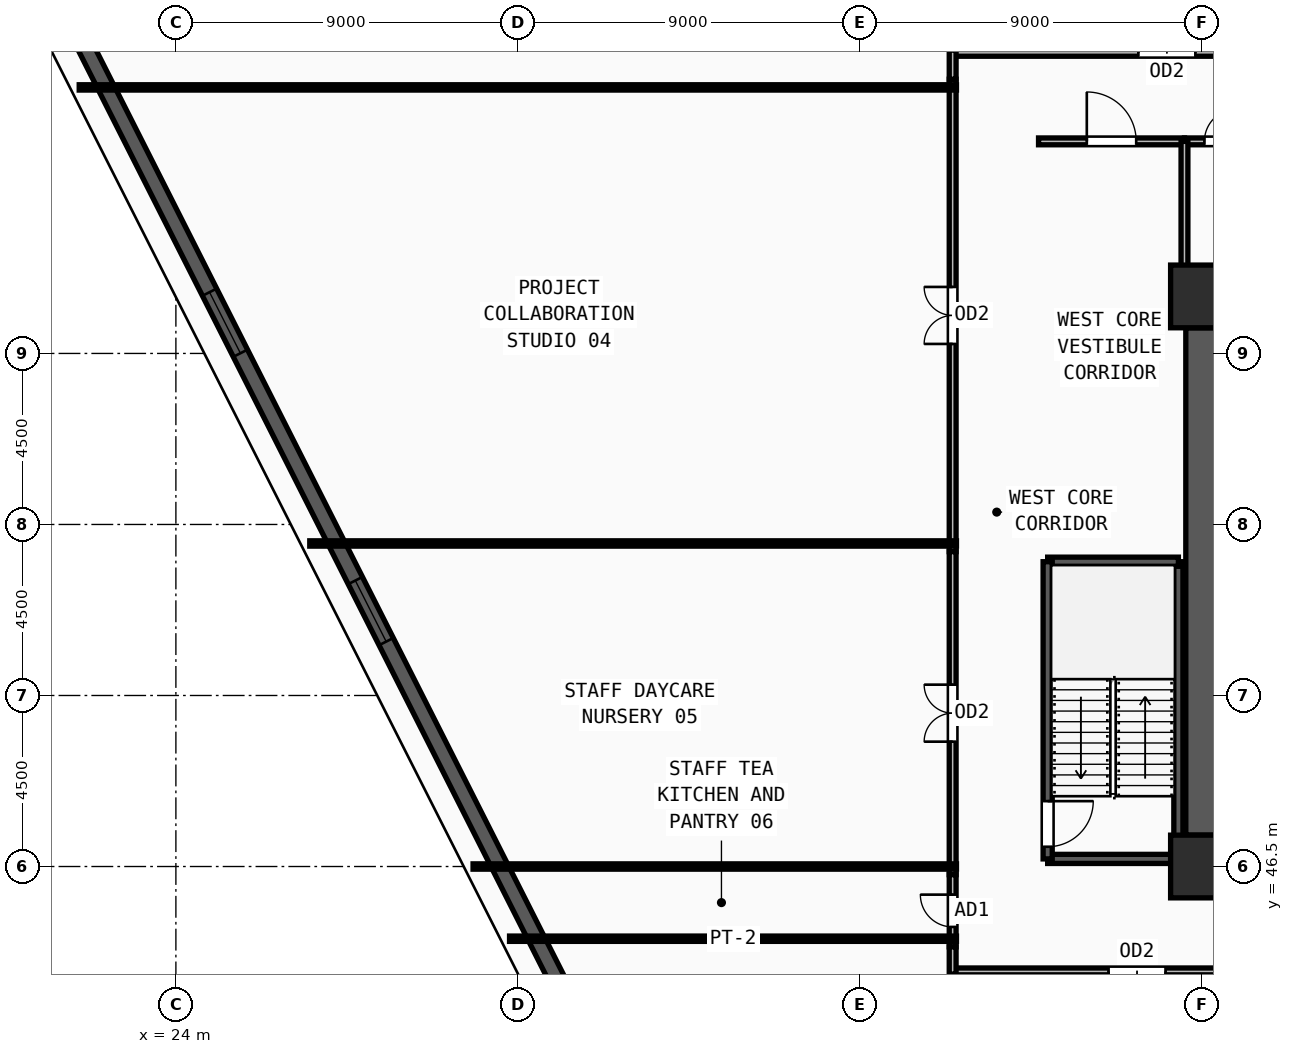
"""IFC4 building model, lengths in metres.
Left out: names, types, materials, properties, quantities, classifications, styles, units other than length and angle.
Written with IfcOpenShell. Run it as: python <this file> out.ifc"""

import sys

from ifc_helpers import new_model, si_unit, direction, frame, frame_2d, origin, origin_2d, place, context, subcontext, project, spatial, rectangle, extrude, source, transform, mapped, element, fill, save


model = new_model("IFC4")
c1 = context("Model", 3, precision=1e-05, world=origin(), true_north=direction((0.0, 1.0)))
c2 = subcontext(c1, "Body", "Model", "MODEL_VIEW")
j1 = project(units=[si_unit("LENGTHUNIT", "METRE"), si_unit("PLANEANGLEUNIT", "RADIAN")], contexts=[c1])
p1 = place(None, origin())
s1 = spatial("IfcSite", under=j1, at=p1, CompositionType="ELEMENT")
p2 = place(p1, origin())
s2 = spatial("IfcBuilding", under=s1, at=p2, CompositionType="ELEMENT")
p3 = place(p2, frame((0.0, 0.0, 39.75)))
s3 = spatial("IfcBuildingStorey", under=s2, at=p3, CompositionType="ELEMENT", Elevation=39.75)
m1 = source(origin(), c2, "Body", "SweptSolid", [
    extrude(rectangle(XDim=1.65, YDim=1.65, at=origin_2d()), origin(), (0.0, 0.0, 1.0), 3.75),
])
for number, where, z_axis, x_axis in (
    (1, (51.0, 46.5, 0.0), (0.0, 0.0, 1.0), (1.0, 0.0, 0.0)),
    (2, (51.0, 61.5, 0.0), (0.0, 0.0, 1.0), (1.0, 0.0, 0.0)),
):
    element("IfcColumn", number, at=place(p3, frame(where, z_axis=z_axis, x_axis=x_axis)), inside=s3, PredefinedType="COLUMN", context=c2, shape_type="MappedRepresentation", body=[
        mapped(m1, transform((0.0, 0.0, 0.0), x_axis=(1.0, 0.0, 0.0), y_axis=(0.0, 1.0, 0.0), z_axis=(0.0, 0.0, 1.0), scale=1.0)),
    ])
p4 = place(p3, frame((21.456, 68.395, 0.0), z_axis=(0.0, 0.0, 1.0), x_axis=(0.451198099626, -0.892423820219, 0.0)))
e3 = element("IfcWall", 3, at=p4, inside=s3, PredefinedType="SOLIDWALL", context=c2, shape_type="SweptSolid", body=[
    extrude(rectangle(XDim=34.005, YDim=0.42, at=frame_2d((17.002, 0.0))), origin(), (0.0, 0.0, 1.0), 3.57),
])
m2 = source(origin(), c2, "Body", "SweptSolid", [
    extrude(rectangle(XDim=1.8, YDim=1.95, at=frame_2d((0.9, 0.975))), frame((0.0, 0.22, 0.0), z_axis=(0.0, -1.0, 0.0), x_axis=(1.0, 0.0, 0.0)), (0.0, 0.0, 1.0), 0.44),
])
p5 = place(p4, frame((7.601, 0.0, 0.55)))
e4 = element("IfcOpeningElement", 4, at=p5, cuts=e3, PredefinedType="OPENING", context=c2, shape_type="MappedRepresentation", body=[
    mapped(m2, transform((0.0, 0.0, 0.0), x_axis=(1.0, 0.0, 0.0), y_axis=(0.0, 1.0, 0.0), z_axis=(0.0, 0.0, 1.0), scale=1.0)),
])
p6 = place(p4, frame((16.103, 0.0, 0.55)))
e5 = element("IfcOpeningElement", 5, at=p6, cuts=e3, PredefinedType="OPENING", context=c2, shape_type="MappedRepresentation", body=[
    mapped(m2, transform((0.0, 0.0, 0.0), x_axis=(1.0, 0.0, 0.0), y_axis=(0.0, 1.0, 0.0), z_axis=(0.0, 0.0, 1.0), scale=1.0)),
])
p7 = place(p3, frame((51.0, 47.325, 0.0), z_axis=(0.0, 0.0, 1.0), x_axis=(0.0, 1.0, 0.0)))
e6 = element("IfcWall", 6, at=p7, inside=s3, PredefinedType="SHEAR", context=c2, shape_type="SweptSolid", body=[
    extrude(rectangle(XDim=13.35, YDim=0.85, at=frame_2d((6.675, 0.0))), origin(), (0.0, 0.0, 1.0), 3.57),
])
p8 = place(p3, frame((46.94, 46.7, 0.0), z_axis=(0.0, 0.0, 1.0), x_axis=(1.0, 0.0, 0.0)))
e7 = element("IfcWall", 7, at=p8, inside=s3, PredefinedType="SOLIDWALL", context=c2, shape_type="SweptSolid", body=[
    extrude(rectangle(XDim=3.44, YDim=0.24, at=frame_2d((1.72, 0.0))), origin(), (0.0, 0.0, 1.0), 3.57),
])
p9 = place(p3, frame((50.38, 46.7, 0.0), z_axis=(0.0, 0.0, 1.0), x_axis=(0.0, 1.0, 0.0)))
e8 = element("IfcWall", 8, at=p9, inside=s3, PredefinedType="SOLIDWALL", context=c2, shape_type="SweptSolid", body=[
    extrude(rectangle(XDim=7.82, YDim=0.24, at=frame_2d((3.91, 0.0))), origin(), (0.0, 0.0, 1.0), 3.57),
])
p10 = place(p3, frame((50.38, 54.52, 0.0), z_axis=(0.0, 0.0, 1.0), x_axis=(-1.0, 0.0, 0.0)))
e9 = element("IfcWall", 9, at=p10, inside=s3, PredefinedType="SOLIDWALL", context=c2, shape_type="SweptSolid", body=[
    extrude(rectangle(XDim=3.44, YDim=0.24, at=frame_2d((1.72, 0.0))), origin(), (0.0, 0.0, 1.0), 3.57),
])
p11 = place(p3, frame((46.94, 54.52, 0.0), z_axis=(0.0, 0.0, 1.0), x_axis=(0.0, -1.0, 0.0)))
e10 = element("IfcWall", 10, at=p11, inside=s3, PredefinedType="SOLIDWALL", context=c2, shape_type="SweptSolid", body=[
    extrude(rectangle(XDim=7.82, YDim=0.24, at=frame_2d((3.91, 0.0))), origin(), (0.0, 0.0, 1.0), 3.57),
])
m3 = source(origin(), c2, "Body", "SweptSolid", [
    extrude(rectangle(XDim=1.2, YDim=2.2, at=frame_2d((0.6, 1.1))), frame((0.0, 0.13, 0.0), z_axis=(0.0, -1.0, 0.0), x_axis=(1.0, 0.0, 0.0)), (0.0, 0.0, 1.0), 0.26),
])
p12 = place(p11, frame((6.3, 0.0, 0.0)))
e11 = element("IfcOpeningElement", 11, at=p12, cuts=e10, PredefinedType="OPENING", context=c2, shape_type="MappedRepresentation", body=[
    mapped(m3, transform((0.0, 0.0, 0.0), x_axis=(1.0, 0.0, 0.0), y_axis=(0.0, 1.0, 0.0), z_axis=(0.0, 0.0, 1.0), scale=1.0)),
])
p13 = place(p3, frame((50.54, 65.58, 0.0), z_axis=(0.0, 0.0, 1.0), x_axis=(1.0, 0.0, 0.0)))
e12 = element("IfcWall", 12, at=p13, inside=s3, PredefinedType="PARTITIONING", context=c2, shape_type="SweptSolid", body=[
    extrude(rectangle(XDim=1.9, YDim=0.18, at=frame_2d((0.95, 0.0))), origin(), (0.0, 0.0, 1.0), 3.57),
])
m4 = source(origin(), c2, "Body", "SweptSolid", [
    extrude(rectangle(XDim=0.85, YDim=2.1, at=frame_2d((0.425, 1.05))), frame((0.0, 0.1, 0.0), z_axis=(0.0, -1.0, 0.0), x_axis=(1.0, 0.0, 0.0)), (0.0, 0.0, 1.0), 0.2),
])
p14 = place(p13, frame((0.525, 0.0, 0.0)))
e13 = element("IfcOpeningElement", 13, at=p14, cuts=e12, PredefinedType="OPENING", context=c2, shape_type="MappedRepresentation", body=[
    mapped(m4, transform((0.0, 0.0, 0.0), x_axis=(1.0, 0.0, 0.0), y_axis=(0.0, 1.0, 0.0), z_axis=(0.0, 0.0, 1.0), scale=1.0)),
])
p15 = place(p3, frame((46.7, 65.58, 0.0), z_axis=(0.0, 0.0, 1.0), x_axis=(1.0, 0.0, 0.0)))
e14 = element("IfcWall", 14, at=p15, inside=s3, PredefinedType="PARTITIONING", context=c2, shape_type="SweptSolid", body=[
    extrude(rectangle(XDim=3.84, YDim=0.18, at=frame_2d((1.92, 0.0))), origin(), (0.0, 0.0, 1.0), 3.57),
])
m5 = source(origin(), c2, "Body", "SweptSolid", [
    extrude(rectangle(XDim=1.3, YDim=2.2, at=frame_2d((0.65, 1.1))), frame((0.0, 0.1, 0.0), z_axis=(0.0, -1.0, 0.0), x_axis=(1.0, 0.0, 0.0)), (0.0, 0.0, 1.0), 0.2),
])
p16 = place(p15, frame((1.27, 0.0, 0.0)))
e15 = element("IfcOpeningElement", 15, at=p16, cuts=e14, PredefinedType="OPENING", context=c2, shape_type="MappedRepresentation", body=[
    mapped(m5, transform((0.0, 0.0, 0.0), x_axis=(1.0, 0.0, 0.0), y_axis=(0.0, 1.0, 0.0), z_axis=(0.0, 0.0, 1.0), scale=1.0)),
])
p17 = place(p3, frame((44.37, 67.91, 0.0), z_axis=(0.0, 0.0, 1.0), x_axis=(1.0, 0.0, 0.0)))
e16 = element("IfcWall", 16, at=p17, inside=s3, PredefinedType="PARTITIONING", context=c2, shape_type="SweptSolid", body=[
    extrude(rectangle(XDim=11.415, YDim=0.18, at=frame_2d((5.708, 0.0))), origin(), (0.0, 0.0, 1.0), 3.57),
])
m6 = source(origin(), c2, "Body", "SweptSolid", [
    extrude(rectangle(XDim=1.5, YDim=2.2, at=frame_2d((0.75, 1.1))), frame((0.0, 0.1, 0.0), z_axis=(0.0, -1.0, 0.0), x_axis=(1.0, 0.0, 0.0)), (0.0, 0.0, 1.0), 0.2),
])
p18 = place(p17, frame((4.957, 0.0, 0.0)))
e17 = element("IfcOpeningElement", 17, at=p18, cuts=e16, PredefinedType="OPENING", context=c2, shape_type="MappedRepresentation", body=[
    mapped(m6, transform((0.0, 0.0, 0.0), x_axis=(1.0, 0.0, 0.0), y_axis=(0.0, 1.0, 0.0), z_axis=(0.0, 0.0, 1.0), scale=1.0)),
])
p19 = place(p3, frame((44.44, 54.785, 0.0), z_axis=(0.0, 0.0, 1.0), x_axis=(0.0, 1.0, 0.0)))
e18 = element("IfcWall", 18, at=p19, inside=s3, PredefinedType="PARTITIONING", context=c2, shape_type="SweptSolid", body=[
    extrude(rectangle(XDim=12.43, YDim=0.18, at=frame_2d((6.215, 0.0))), origin(), (0.0, 0.0, 1.0), 3.57),
])
p20 = place(p19, frame((5.465, 0.0, 0.0)))
e19 = element("IfcOpeningElement", 19, at=p20, cuts=e18, PredefinedType="OPENING", context=c2, shape_type="MappedRepresentation", body=[
    mapped(m6, transform((0.0, 0.0, 0.0), x_axis=(1.0, 0.0, 0.0), y_axis=(0.0, 1.0, 0.0), z_axis=(0.0, 0.0, 1.0), scale=1.0)),
])
p21 = place(p3, frame((44.44, 46.285, 0.0), z_axis=(0.0, 0.0, 1.0), x_axis=(0.0, 1.0, 0.0)))
e20 = element("IfcWall", 20, at=p21, inside=s3, PredefinedType="PARTITIONING", context=c2, shape_type="SweptSolid", body=[
    extrude(rectangle(XDim=8.5, YDim=0.18, at=frame_2d((4.25, 0.0))), origin(), (0.0, 0.0, 1.0), 3.57),
])
p22 = place(p21, frame((3.5, 0.0, 0.0)))
e21 = element("IfcOpeningElement", 21, at=p22, cuts=e20, PredefinedType="OPENING", context=c2, shape_type="MappedRepresentation", body=[
    mapped(m6, transform((0.0, 0.0, 0.0), x_axis=(1.0, 0.0, 0.0), y_axis=(0.0, 1.0, 0.0), z_axis=(0.0, 0.0, 1.0), scale=1.0)),
])
p23 = place(p3, frame((44.44, 44.385, 0.0), z_axis=(0.0, 0.0, 1.0), x_axis=(0.0, 1.0, 0.0)))
e22 = element("IfcWall", 22, at=p23, inside=s3, PredefinedType="PARTITIONING", context=c2, shape_type="SweptSolid", body=[
    extrude(rectangle(XDim=1.9, YDim=0.18, at=frame_2d((0.95, 0.0))), origin(), (0.0, 0.0, 1.0), 3.57),
])
p24 = place(p23, frame((0.525, 0.0, 0.0)))
e23 = element("IfcOpeningElement", 23, at=p24, cuts=e22, PredefinedType="OPENING", context=c2, shape_type="MappedRepresentation", body=[
    mapped(m4, transform((0.0, 0.0, 0.0), x_axis=(1.0, 0.0, 0.0), y_axis=(0.0, 1.0, 0.0), z_axis=(0.0, 0.0, 1.0), scale=1.0)),
])
p25 = place(p3, frame((54.215, 43.74, 0.0), z_axis=(0.0, 0.0, 1.0), x_axis=(-1.0, 0.0, 0.0)))
e24 = element("IfcWall", 24, at=p25, inside=s3, PredefinedType="PARTITIONING", context=c2, shape_type="SweptSolid", body=[
    extrude(rectangle(XDim=9.845, YDim=0.18, at=frame_2d((4.922, 0.0))), origin(), (0.0, 0.0, 1.0), 3.57),
])
p26 = place(p25, frame((4.173, 0.0, 0.0)))
e25 = element("IfcOpeningElement", 25, at=p26, cuts=e24, PredefinedType="OPENING", context=c2, shape_type="MappedRepresentation", body=[
    mapped(m6, transform((0.0, 0.0, 0.0), x_axis=(1.0, 0.0, 0.0), y_axis=(0.0, 1.0, 0.0), z_axis=(0.0, 0.0, 1.0), scale=1.0)),
])
p27 = place(p3, frame((50.54, 61.95, 0.0), z_axis=(0.0, 0.0, 1.0), x_axis=(0.0, 1.0, 0.0)))
e26 = element("IfcWall", 26, at=p27, inside=s3, PredefinedType="PARTITIONING", context=c2, shape_type="SweptSolid", body=[
    extrude(rectangle(XDim=3.63, YDim=0.18, at=frame_2d((1.815, 0.0))), origin(), (0.0, 0.0, 1.0), 3.57),
])
p28 = place(p3, frame((44.44, 67.215, 0.0), z_axis=(0.0, 0.0, 1.0), x_axis=(0.0, 1.0, 0.0)))
e27 = element("IfcWall", 27, at=p28, inside=s3, PredefinedType="PARTITIONING", context=c2, shape_type="SweptSolid", body=[
    extrude(rectangle(XDim=0.765, YDim=0.18, at=frame_2d((0.382, 0.0))), origin(), (0.0, 0.0, 1.0), 3.57),
])
p29 = place(p3, frame((44.44, 43.67, 0.0), z_axis=(0.0, 0.0, 1.0), x_axis=(0.0, 1.0, 0.0)))
e28 = element("IfcWall", 28, at=p29, inside=s3, PredefinedType="PARTITIONING", context=c2, shape_type="SweptSolid", body=[
    extrude(rectangle(XDim=0.715, YDim=0.18, at=frame_2d((0.357, 0.0))), origin(), (0.0, 0.0, 1.0), 3.57),
])
p30 = place(p3, frame((44.54, 44.6, 0.0), z_axis=(0.0, 0.0, 1.0), x_axis=(-1.0, 0.0, 0.0)))
e29 = element("IfcWall", 29, at=p30, inside=s3, PredefinedType="PARTITIONING", context=c2, shape_type="SweptSolid", body=[
    extrude(rectangle(XDim=11.76, YDim=0.14, at=frame_2d((5.88, 0.0))), origin(), (0.0, 0.0, 1.0), 3.57),
])
p31 = place(p3, frame((44.54, 46.5, 0.0), z_axis=(0.0, 0.0, 1.0), x_axis=(-1.0, 0.0, 0.0)))
e30 = element("IfcWall", 30, at=p31, inside=s3, PredefinedType="PARTITIONING", context=c2, shape_type="SweptSolid", body=[
    extrude(rectangle(XDim=12.72, YDim=0.14, at=frame_2d((6.36, 0.0))), origin(), (0.0, 0.0, 1.0), 3.57),
])
p32 = place(p3, frame((44.54, 55.0, 0.0), z_axis=(0.0, 0.0, 1.0), x_axis=(-1.0, 0.0, 0.0)))
e31 = element("IfcWall", 31, at=p32, inside=s3, PredefinedType="PARTITIONING", context=c2, shape_type="SweptSolid", body=[
    extrude(rectangle(XDim=17.017, YDim=0.14, at=frame_2d((8.509, 0.0))), origin(), (0.0, 0.0, 1.0), 3.57),
])
p33 = place(p3, frame((44.54, 67.0, 0.0), z_axis=(0.0, 0.0, 1.0), x_axis=(-1.0, 0.0, 0.0)))
e32 = element("IfcWall", 32, at=p33, inside=s3, PredefinedType="PARTITIONING", context=c2, shape_type="SweptSolid", body=[
    extrude(rectangle(XDim=23.084, YDim=0.14, at=frame_2d((11.542, 0.0))), origin(), (0.0, 0.0, 1.0), 2.655),
])
m7 = source(origin(), c2, "Body", "SweptSolid", [
    extrude(rectangle(XDim=1.8, YDim=1.95, at=frame_2d((0.9, 0.975))), frame((0.0, 0.03, 0.0), z_axis=(0.0, -1.0, 0.0), x_axis=(1.0, 0.0, 0.0)), (0.0, 0.0, 1.0), 0.06),
])
p34 = place(p5, origin())
e33 = element("IfcWindow", 33, at=p34, inside=s3, PartitioningType="DOUBLE_PANEL_VERTICAL", PredefinedType="WINDOW", context=c2, shape_type="MappedRepresentation", body=[
    mapped(m7, transform((0.0, 0.0, 0.0), x_axis=(1.0, 0.0, 0.0), y_axis=(0.0, 1.0, 0.0), z_axis=(0.0, 0.0, 1.0), scale=1.0)),
])
fill(e4, e33)
p35 = place(p6, origin())
e34 = element("IfcWindow", 34, at=p35, inside=s3, PartitioningType="DOUBLE_PANEL_VERTICAL", PredefinedType="WINDOW", context=c2, shape_type="MappedRepresentation", body=[
    mapped(m7, transform((0.0, 0.0, 0.0), x_axis=(1.0, 0.0, 0.0), y_axis=(0.0, 1.0, 0.0), z_axis=(0.0, 0.0, 1.0), scale=1.0)),
])
fill(e5, e34)
m8 = source(origin(), c2, "Body", "SweptSolid", [
    extrude(rectangle(XDim=1.2, YDim=2.2, at=frame_2d((0.6, 1.1))), frame((0.0, 0.025, 0.0), z_axis=(0.0, -1.0, 0.0), x_axis=(1.0, 0.0, 0.0)), (0.0, 0.0, 1.0), 0.05),
])
p36 = place(p12, origin())
e35 = element("IfcDoor", 35, at=p36, inside=s3, OperationType="SINGLE_SWING_LEFT", PredefinedType="DOOR", context=c2, shape_type="MappedRepresentation", body=[
    mapped(m8, transform((0.0, 0.0, 0.0), x_axis=(1.0, 0.0, 0.0), y_axis=(0.0, 1.0, 0.0), z_axis=(0.0, 0.0, 1.0), scale=1.0)),
])
fill(e11, e35)
m9 = source(origin(), c2, "Body", "SweptSolid", [
    extrude(rectangle(XDim=0.85, YDim=2.1, at=frame_2d((0.425, 1.05))), frame((0.0, 0.025, 0.0), z_axis=(0.0, -1.0, 0.0), x_axis=(1.0, 0.0, 0.0)), (0.0, 0.0, 1.0), 0.05),
])
p37 = place(p14, origin())
e36 = element("IfcDoor", 36, at=p37, inside=s3, OperationType="SINGLE_SWING_RIGHT", PredefinedType="DOOR", context=c2, shape_type="MappedRepresentation", body=[
    mapped(m9, transform((0.0, 0.0, 0.0), x_axis=(1.0, 0.0, 0.0), y_axis=(0.0, 1.0, 0.0), z_axis=(0.0, 0.0, 1.0), scale=1.0)),
])
fill(e13, e36)
m10 = source(origin(), c2, "Body", "SweptSolid", [
    extrude(rectangle(XDim=1.3, YDim=2.2, at=frame_2d((0.65, 1.1))), frame((0.0, 0.025, 0.0), z_axis=(0.0, -1.0, 0.0), x_axis=(1.0, 0.0, 0.0)), (0.0, 0.0, 1.0), 0.05),
])
p38 = place(p16, origin())
e37 = element("IfcDoor", 37, at=p38, inside=s3, OperationType="SINGLE_SWING_LEFT", PredefinedType="DOOR", context=c2, shape_type="MappedRepresentation", body=[
    mapped(m10, transform((0.0, 0.0, 0.0), x_axis=(1.0, 0.0, 0.0), y_axis=(0.0, 1.0, 0.0), z_axis=(0.0, 0.0, 1.0), scale=1.0)),
])
fill(e15, e37)
m11 = source(origin(), c2, "Body", "SweptSolid", [
    extrude(rectangle(XDim=1.5, YDim=2.2, at=frame_2d((0.75, 1.1))), frame((0.0, 0.025, 0.0), z_axis=(0.0, -1.0, 0.0), x_axis=(1.0, 0.0, 0.0)), (0.0, 0.0, 1.0), 0.05),
])
p39 = place(p18, origin())
e38 = element("IfcDoor", 38, at=p39, inside=s3, OperationType="DOUBLE_DOOR_SINGLE_SWING", PredefinedType="DOOR", context=c2, shape_type="MappedRepresentation", body=[
    mapped(m11, transform((0.0, 0.0, 0.0), x_axis=(1.0, 0.0, 0.0), y_axis=(0.0, 1.0, 0.0), z_axis=(0.0, 0.0, 1.0), scale=1.0)),
])
fill(e17, e38)
p40 = place(p20, origin())
e39 = element("IfcDoor", 39, at=p40, inside=s3, OperationType="DOUBLE_DOOR_SINGLE_SWING", PredefinedType="DOOR", context=c2, shape_type="MappedRepresentation", body=[
    mapped(m11, transform((0.0, 0.0, 0.0), x_axis=(1.0, 0.0, 0.0), y_axis=(0.0, 1.0, 0.0), z_axis=(0.0, 0.0, 1.0), scale=1.0)),
])
fill(e19, e39)
p41 = place(p22, origin())
e40 = element("IfcDoor", 40, at=p41, inside=s3, OperationType="DOUBLE_DOOR_SINGLE_SWING", PredefinedType="DOOR", context=c2, shape_type="MappedRepresentation", body=[
    mapped(m11, transform((0.0, 0.0, 0.0), x_axis=(1.0, 0.0, 0.0), y_axis=(0.0, 1.0, 0.0), z_axis=(0.0, 0.0, 1.0), scale=1.0)),
])
fill(e21, e40)
p42 = place(p24, origin())
e41 = element("IfcDoor", 41, at=p42, inside=s3, OperationType="SINGLE_SWING_RIGHT", PredefinedType="DOOR", context=c2, shape_type="MappedRepresentation", body=[
    mapped(m9, transform((0.0, 0.0, 0.0), x_axis=(1.0, 0.0, 0.0), y_axis=(0.0, 1.0, 0.0), z_axis=(0.0, 0.0, 1.0), scale=1.0)),
])
fill(e23, e41)
p43 = place(p26, origin())
e42 = element("IfcDoor", 42, at=p43, inside=s3, OperationType="DOUBLE_DOOR_SINGLE_SWING", PredefinedType="DOOR", context=c2, shape_type="MappedRepresentation", body=[
    mapped(m11, transform((0.0, 0.0, 0.0), x_axis=(1.0, 0.0, 0.0), y_axis=(0.0, 1.0, 0.0), z_axis=(0.0, 0.0, 1.0), scale=1.0)),
])
fill(e25, e42)
save(model, sys.argv[1])
